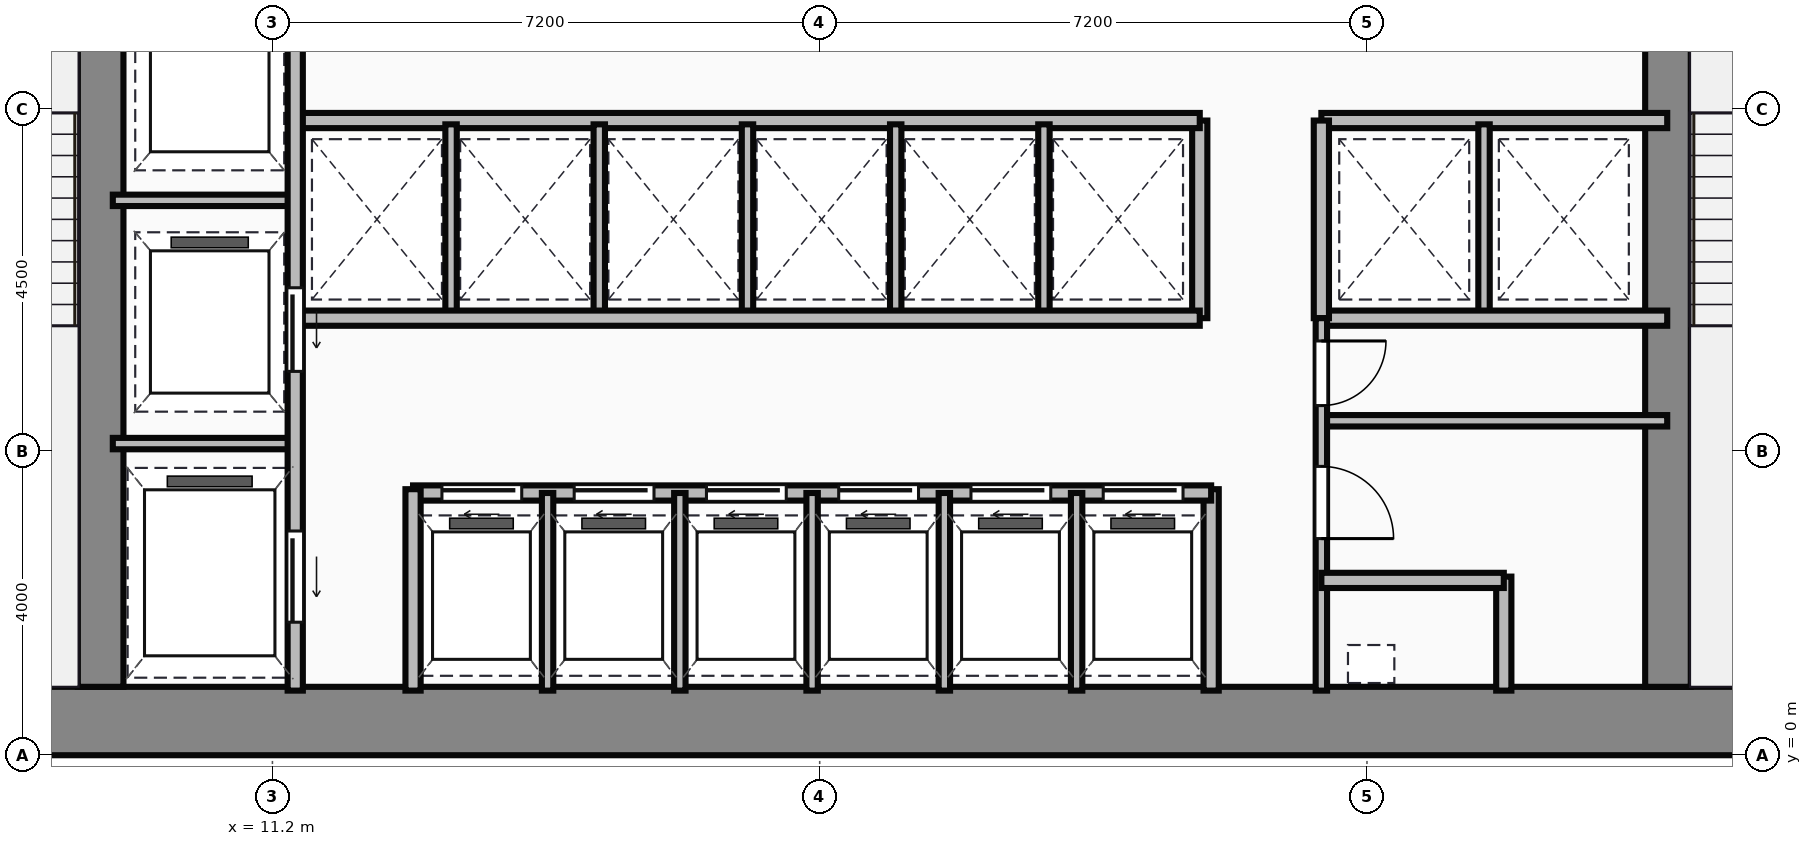
"""IFC4 building model, lengths in metres.
Left out: names, types, materials, properties, quantities, classifications, styles, units other than length and angle.
Written with IfcOpenShell. Run it as: python <this file> out.ifc"""

import sys

from ifc_helpers import new_model, si_unit, direction, frame, frame_2d, origin, place, context, subcontext, project, spatial, rectangle, extrude, source, transform, mapped, element, fill, save


model = new_model("IFC4")
c1 = context("Model", 3, precision=1e-05, world=origin(), true_north=direction((0.0, 1.0)))
c2 = subcontext(c1, "Body", "Model", "MODEL_VIEW")
j1 = project(units=[si_unit("LENGTHUNIT", "METRE"), si_unit("PLANEANGLEUNIT", "RADIAN")], contexts=[c1])
p1 = place(None, origin())
s1 = spatial("IfcSite", under=j1, at=p1, CompositionType="ELEMENT")
p2 = place(p1, origin())
s2 = spatial("IfcBuilding", under=s1, at=p2, CompositionType="ELEMENT")
p3 = place(p2, frame((0.0, 0.0, 72.65)))
s3 = spatial("IfcBuildingStorey", under=s2, at=p3, CompositionType="ELEMENT", Elevation=72.65)
m1 = source(origin(), c2, "Body", "SweptSolid", [
    extrude(rectangle(XDim=29.5, YDim=0.9, at=frame_2d((14.75, 0.0))), origin(), (0.0, 0.0, 1.0), 3.65),
])
p4 = place(p3, frame((4.5, 0.45, 0.0), z_axis=(0.0, 0.0, 1.0), x_axis=(1.0, 0.0, 0.0)))
e1 = element("IfcWall", 1, at=p4, inside=s3, PredefinedType="SHEAR", context=c2, shape_type="MappedRepresentation", body=[
    mapped(m1, transform((0.0, 0.0, 0.0))),
])
m2 = source(origin(), c2, "Body", "SweptSolid", [
    extrude(rectangle(XDim=12.2, YDim=0.6, at=frame_2d((6.1, 0.0))), origin(), (0.0, 0.0, 1.0), 3.65),
])
for number, where, z_axis, x_axis in (
    (2, (8.94, 0.9, 0.0), (0.0, 0.0, 1.0), (0.0, 1.0, 0.0)),
    (3, (29.56, 0.9, 0.0), (0.0, 0.0, 1.0), (0.0, 1.0, 0.0)),
):
    element("IfcWall", number, at=place(p3, frame(where, z_axis=z_axis, x_axis=x_axis)), inside=s3, PredefinedType="SHEAR", context=c2, shape_type="MappedRepresentation", body=[
        mapped(m2, transform((0.0, 0.0, 0.0))),
    ])
m3 = source(origin(), c2, "Body", "SweptSolid", [
    extrude(rectangle(XDim=9.6, YDim=0.2, at=frame_2d((4.8, 0.0))), origin(), (0.0, 0.0, 1.0), 3.4),
])
p5 = place(p3, frame((11.5, 0.85, 0.0), z_axis=(0.0, 0.0, 1.0), x_axis=(0.0, 1.0, 0.0)))
e4 = element("IfcWall", 4, at=p5, inside=s3, PredefinedType="PARTITIONING", context=c2, shape_type="MappedRepresentation", body=[
    mapped(m3, transform((0.0, 0.0, 0.0))),
])
p6 = place(p5, frame((4.2, 0.0, 0.0)))
e5 = element("IfcOpeningElement", 5, at=p6, cuts=e4, PredefinedType="OPENING", context=c2, shape_type="SweptSolid", body=[
    extrude(rectangle(XDim=1.1, YDim=2.15, at=frame_2d((0.55, 1.075))), frame((0.0, 0.11, 0.0), z_axis=(0.0, -1.0, 0.0), x_axis=(1.0, 0.0, 0.0)), (0.0, 0.0, 1.0), 0.22),
])
p7 = place(p5, frame((0.9, 0.0, 0.0)))
e6 = element("IfcOpeningElement", 6, at=p7, cuts=e4, PredefinedType="OPENING", context=c2, shape_type="SweptSolid", body=[
    extrude(rectangle(XDim=1.2, YDim=2.15, at=frame_2d((0.6, 1.075))), frame((0.0, 0.11, 0.0), z_axis=(0.0, -1.0, 0.0), x_axis=(1.0, 0.0, 0.0)), (0.0, 0.0, 1.0), 0.22),
])
m4 = source(origin(), c2, "Body", "SweptSolid", [
    extrude(rectangle(XDim=2.4, YDim=0.15, at=frame_2d((1.2, 0.0))), origin(), (0.0, 0.0, 1.0), 3.4),
])
for number, where, z_axis, x_axis in (
    (7, (9.1, 4.1, 0.0), (0.0, 0.0, 1.0), (1.0, 0.0, 0.0)),
    (8, (9.1, 7.3, 0.0), (0.0, 0.0, 1.0), (1.0, 0.0, 0.0)),
):
    element("IfcWall", number, at=place(p3, frame(where, z_axis=z_axis, x_axis=x_axis)), inside=s3, PredefinedType="PARTITIONING", context=c2, shape_type="MappedRepresentation", body=[
        mapped(m4, transform((0.0, 0.0, 0.0))),
    ])
m5 = source(origin(), c2, "Body", "SweptSolid", [
    extrude(rectangle(XDim=2.65, YDim=0.2, at=frame_2d((1.325, 0.0))), origin(), (0.0, 0.0, 1.0), 3.4),
])
p8 = place(p3, frame((13.05, 0.85, 0.0), z_axis=(0.0, 0.0, 1.0), x_axis=(0.0, 1.0, 0.0)))
e9 = element("IfcWall", 9, at=p8, inside=s3, PredefinedType="PARTITIONING", context=c2, shape_type="MappedRepresentation", body=[
    mapped(m5, transform((0.0, 0.0, 0.0))),
])
m6 = source(origin(), c2, "Body", "SweptSolid", [
    extrude(rectangle(XDim=10.5, YDim=0.2, at=frame_2d((5.25, 0.0))), origin(), (0.0, 0.0, 1.0), 3.4),
])
p9 = place(p3, frame((13.05, 3.45, 0.0), z_axis=(0.0, 0.0, 1.0), x_axis=(1.0, 0.0, 0.0)))
e10 = element("IfcWall", 10, at=p9, inside=s3, PredefinedType="PARTITIONING", context=c2, shape_type="MappedRepresentation", body=[
    mapped(m6, transform((0.0, 0.0, 0.0))),
])
p10 = place(p9, frame((0.38, 0.0, 0.0)))
e11 = element("IfcOpeningElement", 11, at=p10, cuts=e10, PredefinedType="OPENING", context=c2, shape_type="SweptSolid", body=[
    extrude(rectangle(XDim=1.05, YDim=2.15, at=frame_2d((0.525, 1.075))), frame((0.0, 0.11, 0.0), z_axis=(0.0, -1.0, 0.0), x_axis=(1.0, 0.0, 0.0)), (0.0, 0.0, 1.0), 0.22),
])
p11 = place(p9, frame((2.12, 0.0, 0.0)))
e12 = element("IfcOpeningElement", 12, at=p11, cuts=e10, PredefinedType="OPENING", context=c2, shape_type="SweptSolid", body=[
    extrude(rectangle(XDim=1.05, YDim=2.15, at=frame_2d((0.525, 1.075))), frame((0.0, 0.11, 0.0), z_axis=(0.0, -1.0, 0.0), x_axis=(1.0, 0.0, 0.0)), (0.0, 0.0, 1.0), 0.22),
])
p12 = place(p9, frame((3.86, 0.0, 0.0)))
e13 = element("IfcOpeningElement", 13, at=p12, cuts=e10, PredefinedType="OPENING", context=c2, shape_type="SweptSolid", body=[
    extrude(rectangle(XDim=1.05, YDim=2.15, at=frame_2d((0.525, 1.075))), frame((0.0, 0.11, 0.0), z_axis=(0.0, -1.0, 0.0), x_axis=(1.0, 0.0, 0.0)), (0.0, 0.0, 1.0), 0.22),
])
p13 = place(p9, frame((5.6, 0.0, 0.0)))
e14 = element("IfcOpeningElement", 14, at=p13, cuts=e10, PredefinedType="OPENING", context=c2, shape_type="SweptSolid", body=[
    extrude(rectangle(XDim=1.05, YDim=2.15, at=frame_2d((0.525, 1.075))), frame((0.0, 0.11, 0.0), z_axis=(0.0, -1.0, 0.0), x_axis=(1.0, 0.0, 0.0)), (0.0, 0.0, 1.0), 0.22),
])
p14 = place(p9, frame((7.34, 0.0, 0.0)))
e15 = element("IfcOpeningElement", 15, at=p14, cuts=e10, PredefinedType="OPENING", context=c2, shape_type="SweptSolid", body=[
    extrude(rectangle(XDim=1.05, YDim=2.15, at=frame_2d((0.525, 1.075))), frame((0.0, 0.11, 0.0), z_axis=(0.0, -1.0, 0.0), x_axis=(1.0, 0.0, 0.0)), (0.0, 0.0, 1.0), 0.22),
])
p15 = place(p9, frame((9.08, 0.0, 0.0)))
e16 = element("IfcOpeningElement", 16, at=p15, cuts=e10, PredefinedType="OPENING", context=c2, shape_type="SweptSolid", body=[
    extrude(rectangle(XDim=1.05, YDim=2.15, at=frame_2d((0.525, 1.075))), frame((0.0, 0.11, 0.0), z_axis=(0.0, -1.0, 0.0), x_axis=(1.0, 0.0, 0.0)), (0.0, 0.0, 1.0), 0.22),
])
p16 = place(p3, frame((23.55, 0.85, 0.0), z_axis=(0.0, 0.0, 1.0), x_axis=(0.0, 1.0, 0.0)))
e17 = element("IfcWall", 17, at=p16, inside=s3, PredefinedType="PARTITIONING", context=c2, shape_type="MappedRepresentation", body=[
    mapped(m5, transform((0.0, 0.0, 0.0))),
])
m7 = source(origin(), c2, "Body", "SweptSolid", [
    extrude(rectangle(XDim=2.6, YDim=0.15, at=frame_2d((1.3, 0.0))), origin(), (0.0, 0.0, 1.0), 3.4),
])
for number, where, z_axis, x_axis in (
    (18, (14.82, 0.85, 0.0), (0.0, 0.0, 1.0), (0.0, 1.0, 0.0)),
    (19, (16.56, 0.85, 0.0), (0.0, 0.0, 1.0), (0.0, 1.0, 0.0)),
    (20, (18.3, 0.85, 0.0), (0.0, 0.0, 1.0), (0.0, 1.0, 0.0)),
    (21, (20.04, 0.85, 0.0), (0.0, 0.0, 1.0), (0.0, 1.0, 0.0)),
    (22, (21.78, 0.85, 0.0), (0.0, 0.0, 1.0), (0.0, 1.0, 0.0)),
):
    element("IfcWall", number, at=place(p3, frame(where, z_axis=z_axis, x_axis=x_axis)), inside=s3, PredefinedType="PARTITIONING", context=c2, shape_type="MappedRepresentation", body=[
        mapped(m7, transform((0.0, 0.0, 0.0))),
    ])
m8 = source(origin(), c2, "Body", "SweptSolid", [
    extrude(rectangle(XDim=11.85, YDim=0.2, at=frame_2d((5.925, 0.0))), origin(), (0.0, 0.0, 1.0), 3.4),
])
for number, where, z_axis, x_axis in (
    (23, (11.55, 5.75, 0.0), (0.0, 0.0, 1.0), (1.0, 0.0, 0.0)),
    (24, (11.55, 8.35, 0.0), (0.0, 0.0, 1.0), (1.0, 0.0, 0.0)),
):
    element("IfcWall", number, at=place(p3, frame(where, z_axis=z_axis, x_axis=x_axis)), inside=s3, PredefinedType="PARTITIONING", context=c2, shape_type="MappedRepresentation", body=[
        mapped(m8, transform((0.0, 0.0, 0.0))),
    ])
m9 = source(origin(), c2, "Body", "SweptSolid", [
    extrude(rectangle(XDim=2.6, YDim=0.2, at=frame_2d((1.3, 0.0))), origin(), (0.0, 0.0, 1.0), 3.4),
])
p17 = place(p3, frame((23.4, 5.75, 0.0), z_axis=(0.0, 0.0, 1.0), x_axis=(0.0, 1.0, 0.0)))
e25 = element("IfcWall", 25, at=p17, inside=s3, PredefinedType="PARTITIONING", context=c2, shape_type="MappedRepresentation", body=[
    mapped(m9, transform((0.0, 0.0, 0.0))),
])
m10 = source(origin(), c2, "Body", "SweptSolid", [
    extrude(rectangle(XDim=2.5, YDim=0.15, at=frame_2d((1.25, 0.0))), origin(), (0.0, 0.0, 1.0), 3.4),
])
for number, where, z_axis, x_axis in (
    (26, (13.55, 5.8, 0.0), (0.0, 0.0, 1.0), (0.0, 1.0, 0.0)),
    (27, (15.5, 5.8, 0.0), (0.0, 0.0, 1.0), (0.0, 1.0, 0.0)),
    (28, (17.45, 5.8, 0.0), (0.0, 0.0, 1.0), (0.0, 1.0, 0.0)),
    (29, (19.4, 5.8, 0.0), (0.0, 0.0, 1.0), (0.0, 1.0, 0.0)),
    (30, (21.35, 5.8, 0.0), (0.0, 0.0, 1.0), (0.0, 1.0, 0.0)),
):
    element("IfcWall", number, at=place(p3, frame(where, z_axis=z_axis, x_axis=x_axis)), inside=s3, PredefinedType="PARTITIONING", context=c2, shape_type="MappedRepresentation", body=[
        mapped(m10, transform((0.0, 0.0, 0.0))),
    ])
m11 = source(origin(), c2, "Body", "SweptSolid", [
    extrude(rectangle(XDim=4.55, YDim=0.2, at=frame_2d((2.275, 0.0))), origin(), (0.0, 0.0, 1.0), 3.4),
])
for number, where, z_axis, x_axis in (
    (31, (25.0, 8.35, 0.0), (0.0, 0.0, 1.0), (1.0, 0.0, 0.0)),
    (32, (25.0, 5.75, 0.0), (0.0, 0.0, 1.0), (1.0, 0.0, 0.0)),
):
    element("IfcWall", number, at=place(p3, frame(where, z_axis=z_axis, x_axis=x_axis)), inside=s3, PredefinedType="PARTITIONING", context=c2, shape_type="MappedRepresentation", body=[
        mapped(m11, transform((0.0, 0.0, 0.0))),
    ])
p18 = place(p3, frame((25.0, 5.75, 0.0), z_axis=(0.0, 0.0, 1.0), x_axis=(0.0, 1.0, 0.0)))
e33 = element("IfcWall", 33, at=p18, inside=s3, PredefinedType="PARTITIONING", context=c2, shape_type="MappedRepresentation", body=[
    mapped(m9, transform((0.0, 0.0, 0.0))),
])
p19 = place(p3, frame((27.14, 5.8, 0.0), z_axis=(0.0, 0.0, 1.0), x_axis=(0.0, 1.0, 0.0)))
e34 = element("IfcWall", 34, at=p19, inside=s3, PredefinedType="PARTITIONING", context=c2, shape_type="MappedRepresentation", body=[
    mapped(m10, transform((0.0, 0.0, 0.0))),
])
m12 = source(origin(), c2, "Body", "SweptSolid", [
    extrude(rectangle(XDim=4.9, YDim=0.15, at=frame_2d((2.45, 0.0))), origin(), (0.0, 0.0, 1.0), 3.4),
])
p20 = place(p3, frame((25.0, 0.85, 0.0), z_axis=(0.0, 0.0, 1.0), x_axis=(0.0, 1.0, 0.0)))
e35 = element("IfcWall", 35, at=p20, inside=s3, PredefinedType="PARTITIONING", context=c2, shape_type="MappedRepresentation", body=[
    mapped(m12, transform((0.0, 0.0, 0.0))),
])
p21 = place(p20, frame((2.0, 0.0, 0.0)))
e36 = element("IfcOpeningElement", 36, at=p21, cuts=e35, PredefinedType="OPENING", context=c2, shape_type="SweptSolid", body=[
    extrude(rectangle(XDim=0.95, YDim=2.15, at=frame_2d((0.475, 1.075))), frame((0.0, 0.085, 0.0), z_axis=(0.0, -1.0, 0.0), x_axis=(1.0, 0.0, 0.0)), (0.0, 0.0, 1.0), 0.17),
])
p22 = place(p20, frame((3.75, 0.0, 0.0)))
e37 = element("IfcOpeningElement", 37, at=p22, cuts=e35, PredefinedType="OPENING", context=c2, shape_type="SweptSolid", body=[
    extrude(rectangle(XDim=0.85, YDim=2.15, at=frame_2d((0.425, 1.075))), frame((0.0, 0.085, 0.0), z_axis=(0.0, -1.0, 0.0), x_axis=(1.0, 0.0, 0.0)), (0.0, 0.0, 1.0), 0.17),
])
m13 = source(origin(), c2, "Body", "SweptSolid", [
    extrude(rectangle(XDim=2.4, YDim=0.2, at=frame_2d((1.2, 0.0))), origin(), (0.0, 0.0, 1.0), 3.4),
])
p23 = place(p3, frame((25.0, 2.3, 0.0), z_axis=(0.0, 0.0, 1.0), x_axis=(1.0, 0.0, 0.0)))
e38 = element("IfcWall", 38, at=p23, inside=s3, PredefinedType="PARTITIONING", context=c2, shape_type="MappedRepresentation", body=[
    mapped(m13, transform((0.0, 0.0, 0.0))),
])
m14 = source(origin(), c2, "Body", "SweptSolid", [
    extrude(rectangle(XDim=1.5, YDim=0.2, at=frame_2d((0.75, 0.0))), origin(), (0.0, 0.0, 1.0), 3.4),
])
p24 = place(p3, frame((27.4, 0.85, 0.0), z_axis=(0.0, 0.0, 1.0), x_axis=(0.0, 1.0, 0.0)))
e39 = element("IfcWall", 39, at=p24, inside=s3, PredefinedType="PARTITIONING", context=c2, shape_type="MappedRepresentation", body=[
    mapped(m14, transform((0.0, 0.0, 0.0))),
])
m15 = source(origin(), c2, "Body", "SweptSolid", [
    extrude(rectangle(XDim=4.55, YDim=0.15, at=frame_2d((2.275, 0.0))), origin(), (0.0, 0.0, 1.0), 3.4),
])
p25 = place(p3, frame((25.0, 4.4, 0.0), z_axis=(0.0, 0.0, 1.0), x_axis=(1.0, 0.0, 0.0)))
e40 = element("IfcWall", 40, at=p25, inside=s3, PredefinedType="PARTITIONING", context=c2, shape_type="MappedRepresentation", body=[
    mapped(m15, transform((0.0, 0.0, 0.0))),
])
m16 = source(origin(), c2, "Body", "SweptSolid", [
    extrude(rectangle(XDim=1.1, YDim=2.15, at=frame_2d((0.55, 1.075))), frame((0.0, 0.025, 0.0), z_axis=(0.0, -1.0, 0.0), x_axis=(1.0, 0.0, 0.0)), (0.0, 0.0, 1.0), 0.05),
])
p26 = place(p6, frame((1.1, 0.0, 0.0), z_axis=(0.0, 0.0, 1.0), x_axis=(-1.0, 0.0, 0.0)))
e41 = element("IfcDoor", 41, at=p26, inside=s3, OperationType="SLIDING_TO_LEFT", PredefinedType="DOOR", context=c2, shape_type="MappedRepresentation", body=[
    mapped(m16, transform((0.0, 0.0, 0.0))),
])
fill(e5, e41)
m17 = source(origin(), c2, "Body", "SweptSolid", [
    extrude(rectangle(XDim=1.2, YDim=2.15, at=frame_2d((0.6, 1.075))), frame((0.0, 0.025, 0.0), z_axis=(0.0, -1.0, 0.0), x_axis=(1.0, 0.0, 0.0)), (0.0, 0.0, 1.0), 0.05),
])
p27 = place(p7, frame((1.2, 0.0, 0.0), z_axis=(0.0, 0.0, 1.0), x_axis=(-1.0, 0.0, 0.0)))
e42 = element("IfcDoor", 42, at=p27, inside=s3, OperationType="SLIDING_TO_LEFT", PredefinedType="DOOR", context=c2, shape_type="MappedRepresentation", body=[
    mapped(m17, transform((0.0, 0.0, 0.0))),
])
fill(e6, e42)
m18 = source(origin(), c2, "Body", "SweptSolid", [
    extrude(rectangle(XDim=1.05, YDim=2.15, at=frame_2d((0.525, 1.075))), frame((0.0, 0.025, 0.0), z_axis=(0.0, -1.0, 0.0), x_axis=(1.0, 0.0, 0.0)), (0.0, 0.0, 1.0), 0.05),
])
p28 = place(p10, origin())
e43 = element("IfcDoor", 43, at=p28, inside=s3, OperationType="SLIDING_TO_LEFT", PredefinedType="DOOR", context=c2, shape_type="MappedRepresentation", body=[
    mapped(m18, transform((0.0, 0.0, 0.0))),
])
fill(e11, e43)
p29 = place(p11, origin())
e44 = element("IfcDoor", 44, at=p29, inside=s3, OperationType="SLIDING_TO_LEFT", PredefinedType="DOOR", context=c2, shape_type="MappedRepresentation", body=[
    mapped(m18, transform((0.0, 0.0, 0.0))),
])
fill(e12, e44)
p30 = place(p12, origin())
e45 = element("IfcDoor", 45, at=p30, inside=s3, OperationType="SLIDING_TO_LEFT", PredefinedType="DOOR", context=c2, shape_type="MappedRepresentation", body=[
    mapped(m18, transform((0.0, 0.0, 0.0))),
])
fill(e13, e45)
p31 = place(p13, origin())
e46 = element("IfcDoor", 46, at=p31, inside=s3, OperationType="SLIDING_TO_LEFT", PredefinedType="DOOR", context=c2, shape_type="MappedRepresentation", body=[
    mapped(m18, transform((0.0, 0.0, 0.0))),
])
fill(e14, e46)
p32 = place(p14, origin())
e47 = element("IfcDoor", 47, at=p32, inside=s3, OperationType="SLIDING_TO_LEFT", PredefinedType="DOOR", context=c2, shape_type="MappedRepresentation", body=[
    mapped(m18, transform((0.0, 0.0, 0.0))),
])
fill(e15, e47)
p33 = place(p15, origin())
e48 = element("IfcDoor", 48, at=p33, inside=s3, OperationType="SLIDING_TO_LEFT", PredefinedType="DOOR", context=c2, shape_type="MappedRepresentation", body=[
    mapped(m18, transform((0.0, 0.0, 0.0))),
])
fill(e16, e48)
m19 = source(origin(), c2, "Body", "SweptSolid", [
    extrude(rectangle(XDim=0.95, YDim=2.15, at=frame_2d((0.475, 1.075))), frame((0.0, 0.025, 0.0), z_axis=(0.0, -1.0, 0.0), x_axis=(1.0, 0.0, 0.0)), (0.0, 0.0, 1.0), 0.05),
])
p34 = place(p21, origin())
e49 = element("IfcDoor", 49, at=p34, inside=s3, OperationType="SINGLE_SWING_LEFT", PredefinedType="DOOR", context=c2, shape_type="MappedRepresentation", body=[
    mapped(m19, transform((0.0, 0.0, 0.0))),
])
fill(e36, e49)
m20 = source(origin(), c2, "Body", "SweptSolid", [
    extrude(rectangle(XDim=0.85, YDim=2.15, at=frame_2d((0.425, 1.075))), frame((0.0, 0.025, 0.0), z_axis=(0.0, -1.0, 0.0), x_axis=(1.0, 0.0, 0.0)), (0.0, 0.0, 1.0), 0.05),
])
p35 = place(p22, origin())
e50 = element("IfcDoor", 50, at=p35, inside=s3, OperationType="SINGLE_SWING_RIGHT", PredefinedType="DOOR", context=c2, shape_type="MappedRepresentation", body=[
    mapped(m20, transform((0.0, 0.0, 0.0))),
])
fill(e37, e50)
save(model, sys.argv[1])
